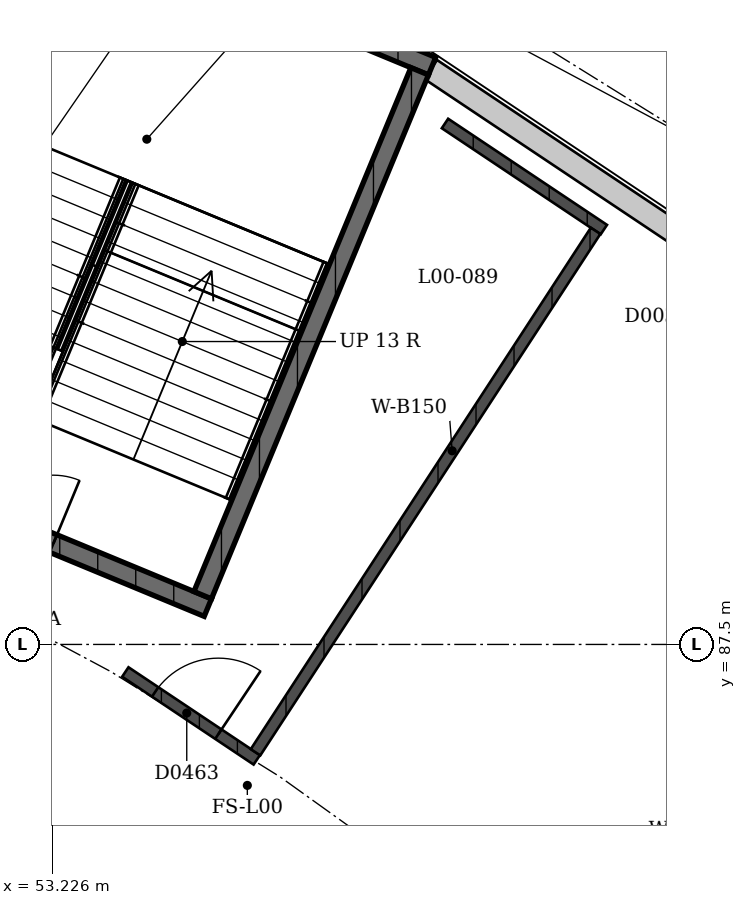
"""IFC4 building model, lengths in metres.
Left out: names, types, materials, properties, quantities, classifications, styles, units other than length and angle.
Written with IfcOpenShell. Run it as: python <this file> out.ifc"""

import sys

from ifc_helpers import new_model, si_unit, direction, frame, frame_2d, origin, place, context, subcontext, project, spatial, rectangle, extrude, element, fill, save


model = new_model("IFC4")
c1 = context("Model", 3, precision=1e-05, world=origin(), true_north=direction((0.0, 1.0)))
c2 = subcontext(c1, "Body", "Model", "MODEL_VIEW")
j1 = project(units=[si_unit("LENGTHUNIT", "METRE"), si_unit("PLANEANGLEUNIT", "RADIAN")], contexts=[c1])
p1 = place(None, origin())
s1 = spatial("IfcSite", under=j1, at=p1, CompositionType="ELEMENT")
p2 = place(p1, origin())
s2 = spatial("IfcBuilding", under=s1, at=p2, CompositionType="ELEMENT")
p3 = place(p2, origin())
s3 = spatial("IfcBuildingStorey", under=s2, at=p3, CompositionType="ELEMENT", Elevation=0.0)
p4 = place(p3, frame((58.206, 95.064, 0.0), z_axis=(0.0, 0.0, 1.0), x_axis=(0.831466044974, -0.555575571867, 0.0)))
e1 = element("IfcWall", 1, at=p4, inside=s3, PredefinedType="SOLIDWALL", context=c2, shape_type="SweptSolid", body=[
    extrude(rectangle(XDim=12.675, YDim=0.3, at=frame_2d((6.337, 0.0))), origin(), (0.0, 0.0, 1.0), 2.79),
])
p5 = place(p4, frame((4.363, 0.0, 0.0)))
e2 = element("IfcOpeningElement", 2, at=p5, cuts=e1, PredefinedType="OPENING", context=c2, shape_type="SweptSolid", body=[
    extrude(rectangle(XDim=3.0, YDim=2.4, at=frame_2d((1.5, 1.2))), frame((0.0, 0.16, 0.0), z_axis=(0.0, -1.0, 0.0), x_axis=(1.0, 0.0, 0.0)), (0.0, 0.0, 1.0), 0.32),
])
p6 = place(p3, frame((55.274, 87.985, 0.0), z_axis=(0.0, 0.0, 1.0), x_axis=(-0.923877480578, 0.382688386133, 0.0)))
e3 = element("IfcWall", 3, at=p6, inside=s3, PredefinedType="SHEAR", context=c2, shape_type="SweptSolid", body=[
    extrude(rectangle(XDim=12.15, YDim=0.25, at=frame_2d((6.075, 0.0))), origin(), (0.0, 0.0, 1.0), 4.09),
])
p7 = place(p6, frame((2.2, 0.0, 0.0)))
e4 = element("IfcOpeningElement", 4, at=p7, cuts=e3, PredefinedType="OPENING", context=c2, shape_type="SweptSolid", body=[
    extrude(rectangle(XDim=1.8, YDim=2.1, at=frame_2d((0.9, 1.05))), frame((0.0, 0.125, 0.0), z_axis=(0.0, -1.0, 0.0), x_axis=(1.0, 0.0, 0.0)), (0.0, 0.0, 1.0), 0.25),
])
p8 = place(p6, frame((8.15, 0.0, 0.0)))
e5 = element("IfcOpeningElement", 5, at=p8, cuts=e3, PredefinedType="OPENING", context=c2, shape_type="SweptSolid", body=[
    extrude(rectangle(XDim=1.8, YDim=2.1, at=frame_2d((0.9, 1.05))), frame((0.0, 0.125, 0.0), z_axis=(0.0, -1.0, 0.0), x_axis=(1.0, 0.0, 0.0)), (0.0, 0.0, 1.0), 0.25),
])
p9 = place(p3, frame((58.224, 95.108, 0.0), z_axis=(0.0, 0.0, 1.0), x_axis=(-0.923884584817, 0.382671234792, 0.0)))
e6 = element("IfcWall", 6, at=p9, inside=s3, PredefinedType="SHEAR", context=c2, shape_type="SweptSolid", body=[
    extrude(rectangle(XDim=12.15, YDim=0.25, at=frame_2d((6.075, 0.0))), origin(), (0.0, 0.0, 1.0), 4.09),
])
p10 = place(p3, frame((55.206, 88.148, 0.0), z_axis=(0.0, 0.0, 1.0), x_axis=(0.382664910245, 0.923887204407, 0.0)))
e7 = element("IfcWall", 7, at=p10, inside=s3, PredefinedType="SHEAR", context=c2, shape_type="SweptSolid", body=[
    extrude(rectangle(XDim=7.46, YDim=0.25, at=frame_2d((3.73, 0.0))), origin(), (0.0, 0.0, 1.0), 4.09),
])
p11 = place(p3, frame((54.188, 87.138, 0.0), z_axis=(0.0, 0.0, 1.0), x_axis=(0.831435859109, -0.555620744921, 0.0)))
e8 = element("IfcWall", 8, at=p11, inside=s3, PredefinedType="SOLIDWALL", context=c2, shape_type="SweptSolid", body=[
    extrude(rectangle(XDim=2.08, YDim=0.15, at=frame_2d((1.04, 0.0))), origin(), (0.0, 0.0, 1.0), 3.0),
])
p12 = place(p11, frame((0.472, 0.0, 0.0)))
e9 = element("IfcOpeningElement", 9, at=p12, cuts=e8, PredefinedType="OPENING", context=c2, shape_type="SweptSolid", body=[
    extrude(rectangle(XDim=1.0, YDim=2.1, at=frame_2d((0.5, 1.05))), frame((0.0, 0.075, 0.0), z_axis=(0.0, -1.0, 0.0), x_axis=(1.0, 0.0, 0.0)), (0.0, 0.0, 1.0), 0.15),
])
p13 = place(p3, frame((58.394, 94.354, 0.0), z_axis=(0.0, 0.0, 1.0), x_axis=(0.83145207432, -0.555596479569, 0.0)))
e10 = element("IfcWall", 10, at=p13, inside=s3, PredefinedType="SOLIDWALL", context=c2, shape_type="SweptSolid", body=[
    extrude(rectangle(XDim=2.513, YDim=0.15, at=frame_2d((1.257, 0.0))), origin(), (0.0, 0.0, 1.0), 3.0),
])
p14 = place(p3, frame((55.902, 86.081, 0.0), z_axis=(0.0, 0.0, 1.0), x_axis=(0.546272327191, 0.837607631618, 0.0)))
e11 = element("IfcWall", 11, at=p14, inside=s3, PredefinedType="SOLIDWALL", context=c2, shape_type="SweptSolid", body=[
    extrude(rectangle(XDim=8.19, YDim=0.15, at=frame_2d((4.095, 0.0))), origin(), (0.0, 0.0, 1.0), 3.0),
])
p15 = place(p7, origin())
e12 = element("IfcDoor", 12, at=p15, inside=s3, OperationType="DOUBLE_DOOR_SINGLE_SWING", PredefinedType="DOOR", context=c2, shape_type="SweptSolid", body=[
    extrude(rectangle(XDim=1.8, YDim=2.1, at=frame_2d((0.9, 1.05))), frame((0.0, 0.025, 0.0), z_axis=(0.0, -1.0, 0.0), x_axis=(1.0, 0.0, 0.0)), (0.0, 0.0, 1.0), 0.05),
])
fill(e4, e12)
p16 = place(p12, origin())
e13 = element("IfcDoor", 13, at=p16, inside=s3, OperationType="SINGLE_SWING_LEFT", PredefinedType="DOOR", context=c2, shape_type="SweptSolid", body=[
    extrude(rectangle(XDim=1.0, YDim=2.1, at=frame_2d((0.5, 1.05))), frame((0.0, 0.025, 0.0), z_axis=(0.0, -1.0, 0.0), x_axis=(1.0, 0.0, 0.0)), (0.0, 0.0, 1.0), 0.05),
])
fill(e9, e13)
save(model, sys.argv[1])
